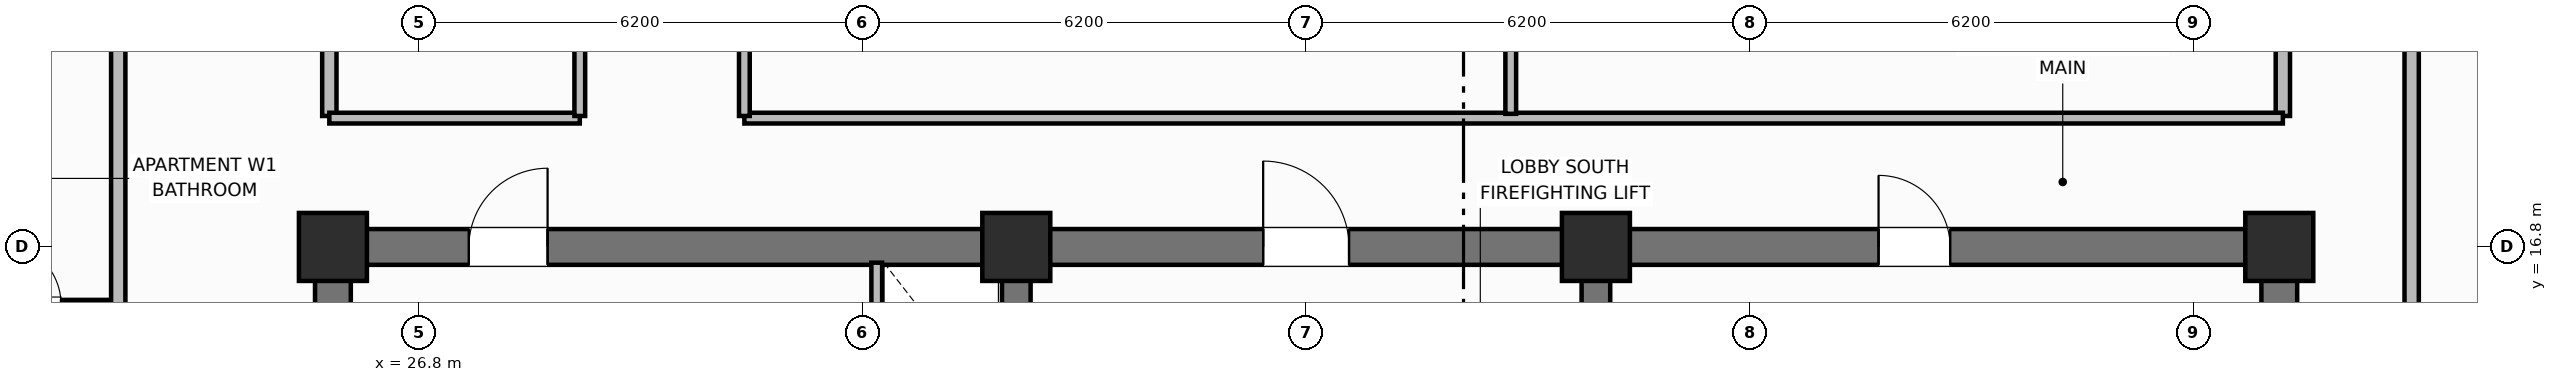
"""IFC4 building model, lengths in metres.
Left out: names, types, materials, properties, quantities, classifications, styles, units other than length and angle.
Written with IfcOpenShell. Run it as: python <this file> out.ifc"""

import sys

from ifc_helpers import new_model, si_unit, direction, frame, frame_2d, origin, origin_2d, place, context, subcontext, project, spatial, rectangle, extrude, element, fill, save


model = new_model("IFC4")
c1 = context("Model", 3, precision=1e-05, world=origin(), true_north=direction((0.0, 1.0)))
c2 = subcontext(c1, "Body", "Model", "MODEL_VIEW")
j1 = project(units=[si_unit("LENGTHUNIT", "METRE"), si_unit("PLANEANGLEUNIT", "RADIAN")], contexts=[c1])
p1 = place(None, origin())
s1 = spatial("IfcSite", under=j1, at=p1, CompositionType="ELEMENT")
p2 = place(p1, origin())
s2 = spatial("IfcBuilding", under=s1, at=p2, CompositionType="ELEMENT")
p3 = place(p2, frame((0.0, 0.0, 181.1)))
s3 = spatial("IfcBuildingStorey", under=s2, at=p3, CompositionType="ELEMENT", Elevation=181.1)
for number, where, z_axis, x_axis in (
    (1, (25.6, 10.85, 0.0), (0.0, 0.0, 1.0), (0.0, 1.0, 0.0)),
    (2, (52.8, 10.85, 0.0), (0.0, 0.0, 1.0), (0.0, 1.0, 0.0)),
):
    element("IfcWall", number, at=place(p3, frame(where, z_axis=z_axis, x_axis=x_axis)), inside=s3, PredefinedType="SHEAR", context=c2, shape_type="SweptSolid", body=[
        extrude(rectangle(XDim=5.7, YDim=0.5, at=frame_2d((2.85, 0.0))), origin(), (0.0, 0.0, 1.0), 3.7),
    ])
p4 = place(p3, frame((25.6, 16.8, 0.0), z_axis=(0.0, 0.0, 1.0), x_axis=(1.0, 0.0, 0.0)))
e3 = element("IfcWall", 3, at=p4, inside=s3, PredefinedType="SHEAR", context=c2, shape_type="SweptSolid", body=[
    extrude(rectangle(XDim=27.2, YDim=0.5, at=frame_2d((13.6, 0.0))), origin(), (0.0, 0.0, 1.0), 3.7),
])
p5 = place(p4, frame((1.9, 0.0, 0.0)))
e4 = element("IfcOpeningElement", 4, at=p5, cuts=e3, PredefinedType="OPENING", context=c2, shape_type="SweptSolid", body=[
    extrude(rectangle(XDim=1.1, YDim=2.15, at=frame_2d((0.55, 1.075))), frame((0.0, 0.26, 0.0), z_axis=(0.0, -1.0, 0.0), x_axis=(1.0, 0.0, 0.0)), (0.0, 0.0, 1.0), 0.52),
])
p6 = place(p4, frame((13.0, 0.0, 0.0)))
e5 = element("IfcOpeningElement", 5, at=p6, cuts=e3, PredefinedType="OPENING", context=c2, shape_type="SweptSolid", body=[
    extrude(rectangle(XDim=1.2, YDim=2.15, at=frame_2d((0.6, 1.075))), frame((0.0, 0.26, 0.0), z_axis=(0.0, -1.0, 0.0), x_axis=(1.0, 0.0, 0.0)), (0.0, 0.0, 1.0), 0.52),
])
p7 = place(p4, frame((21.6, 0.0, 0.0)))
e6 = element("IfcOpeningElement", 6, at=p7, cuts=e3, PredefinedType="OPENING", context=c2, shape_type="SweptSolid", body=[
    extrude(rectangle(XDim=1.0, YDim=2.15, at=frame_2d((0.5, 1.075))), frame((0.0, 0.26, 0.0), z_axis=(0.0, -1.0, 0.0), x_axis=(1.0, 0.0, 0.0)), (0.0, 0.0, 1.0), 0.52),
])
for number, where, z_axis, x_axis in (
    (7, (35.15, 10.85, 0.0), (0.0, 0.0, 1.0), (0.0, 1.0, 0.0)),
    (8, (43.25, 10.85, 0.0), (0.0, 0.0, 1.0), (0.0, 1.0, 0.0)),
):
    element("IfcWall", number, at=place(p3, frame(where, z_axis=z_axis, x_axis=x_axis)), inside=s3, PredefinedType="SHEAR", context=c2, shape_type="SweptSolid", body=[
        extrude(rectangle(XDim=5.7, YDim=0.4, at=frame_2d((2.85, 0.0))), origin(), (0.0, 0.0, 1.0), 3.7),
    ])
for number, where, z_axis, x_axis in (
    (9, (25.6, 16.8, 0.0), (0.0, 0.0, 1.0), (1.0, 0.0, 0.0)),
    (10, (35.15, 16.8, 0.0), (0.0, 0.0, 1.0), (1.0, 0.0, 0.0)),
    (11, (43.25, 16.8, 0.0), (0.0, 0.0, 1.0), (1.0, 0.0, 0.0)),
    (12, (52.8, 16.8, 0.0), (0.0, 0.0, 1.0), (1.0, 0.0, 0.0)),
):
    element("IfcColumn", number, at=place(p3, frame(where, z_axis=z_axis, x_axis=x_axis)), inside=s3, PredefinedType="COLUMN", context=c2, shape_type="SweptSolid", body=[
        extrude(rectangle(XDim=0.95, YDim=0.95, at=origin_2d()), origin(), (0.0, 0.0, 1.0), 3.7),
    ])
p8 = place(p3, frame((33.2, 14.5, 0.0), z_axis=(0.0, 0.0, 1.0), x_axis=(0.0, 1.0, 0.0)))
e13 = element("IfcWall", 13, at=p8, inside=s3, PredefinedType="PARTITIONING", context=c2, shape_type="SweptSolid", body=[
    extrude(rectangle(XDim=2.08, YDim=0.15, at=frame_2d((1.04, 0.0))), origin(), (0.0, 0.0, 1.0), 2.55),
])
p9 = place(p8, frame((0.55, 0.0, 0.0)))
e14 = element("IfcOpeningElement", 14, at=p9, cuts=e13, PredefinedType="OPENING", context=c2, shape_type="SweptSolid", body=[
    extrude(rectangle(XDim=0.85, YDim=2.05, at=frame_2d((0.425, 1.025))), frame((0.0, 0.085, 0.0), z_axis=(0.0, -1.0, 0.0), x_axis=(1.0, 0.0, 0.0)), (0.0, 0.0, 1.0), 0.17),
])
for number, where, z_axis, x_axis in (
    (15, (25.55, 18.63, 0.0), (0.0, 0.0, 1.0), (0.0, 1.0, 0.0)),
    (16, (52.85, 18.63, 0.0), (0.0, 0.0, 1.0), (0.0, 1.0, 0.0)),
):
    element("IfcWall", number, at=place(p3, frame(where, z_axis=z_axis, x_axis=x_axis)), inside=s3, PredefinedType="PARTITIONING", context=c2, shape_type="SweptSolid", body=[
        extrude(rectangle(XDim=19.14, YDim=0.2, at=frame_2d((9.57, 0.0))), origin(), (0.0, 0.0, 1.0), 2.55),
    ])
p10 = place(p3, frame((25.55, 18.6, 0.0), z_axis=(0.0, 0.0, 1.0), x_axis=(1.0, 0.0, 0.0)))
e17 = element("IfcWall", 17, at=p10, inside=s3, PredefinedType="PARTITIONING", context=c2, shape_type="SweptSolid", body=[
    extrude(rectangle(XDim=3.5, YDim=0.15, at=frame_2d((1.75, 0.0))), origin(), (0.0, 0.0, 1.0), 2.55),
])
p11 = place(p3, frame((31.35, 18.6, 0.0), z_axis=(0.0, 0.0, 1.0), x_axis=(1.0, 0.0, 0.0)))
e18 = element("IfcWall", 18, at=p11, inside=s3, PredefinedType="PARTITIONING", context=c2, shape_type="SweptSolid", body=[
    extrude(rectangle(XDim=21.5, YDim=0.15, at=frame_2d((10.75, 0.0))), origin(), (0.0, 0.0, 1.0), 2.55),
])
p12 = place(p3, frame((42.06, 18.66, 0.0), z_axis=(0.0, 0.0, 1.0), x_axis=(0.0, 1.0, 0.0)))
e19 = element("IfcWall", 19, at=p12, inside=s3, PredefinedType="PARTITIONING", context=c2, shape_type="SweptSolid", body=[
    extrude(rectangle(XDim=19.08, YDim=0.15, at=frame_2d((9.54, 0.0))), origin(), (0.0, 0.0, 1.0), 2.55),
])
p13 = place(p12, frame((6.5, 0.0, 0.0)))
e20 = element("IfcOpeningElement", 20, at=p13, cuts=e19, PredefinedType="OPENING", context=c2, shape_type="SweptSolid", body=[
    extrude(rectangle(XDim=1.0, YDim=2.15, at=frame_2d((0.5, 1.075))), frame((0.0, 0.085, 0.0), z_axis=(0.0, -1.0, 0.0), x_axis=(1.0, 0.0, 0.0)), (0.0, 0.0, 1.0), 0.17),
])
p14 = place(p3, frame((29.05, 18.63, 0.0), z_axis=(0.0, 0.0, 1.0), x_axis=(0.0, 1.0, 0.0)))
e21 = element("IfcWall", 21, at=p14, inside=s3, PredefinedType="PARTITIONING", context=c2, shape_type="SweptSolid", body=[
    extrude(rectangle(XDim=19.14, YDim=0.15, at=frame_2d((9.57, 0.0))), origin(), (0.0, 0.0, 1.0), 2.55),
])
p15 = place(p14, frame((5.5, 0.0, 0.0)))
e22 = element("IfcOpeningElement", 22, at=p15, cuts=e21, PredefinedType="OPENING", context=c2, shape_type="SweptSolid", body=[
    extrude(rectangle(XDim=1.0, YDim=2.15, at=frame_2d((0.5, 1.075))), frame((0.0, 0.085, 0.0), z_axis=(0.0, -1.0, 0.0), x_axis=(1.0, 0.0, 0.0)), (0.0, 0.0, 1.0), 0.17),
])
p16 = place(p3, frame((31.35, 18.63, 0.0), z_axis=(0.0, 0.0, 1.0), x_axis=(0.0, 1.0, 0.0)))
e23 = element("IfcWall", 23, at=p16, inside=s3, PredefinedType="PARTITIONING", context=c2, shape_type="SweptSolid", body=[
    extrude(rectangle(XDim=19.14, YDim=0.15, at=frame_2d((9.57, 0.0))), origin(), (0.0, 0.0, 1.0), 2.55),
])
p17 = place(p16, frame((5.5, 0.0, 0.0)))
e24 = element("IfcOpeningElement", 24, at=p17, cuts=e23, PredefinedType="OPENING", context=c2, shape_type="SweptSolid", body=[
    extrude(rectangle(XDim=1.0, YDim=2.15, at=frame_2d((0.5, 1.075))), frame((0.0, 0.085, 0.0), z_axis=(0.0, -1.0, 0.0), x_axis=(1.0, 0.0, 0.0)), (0.0, 0.0, 1.0), 0.17),
])
p18 = place(p3, frame((20.35, 16.0, 0.0), z_axis=(0.0, 0.0, 1.0), x_axis=(1.0, 0.0, 0.0)))
e25 = element("IfcWall", 25, at=p18, inside=s3, PredefinedType="PARTITIONING", context=c2, shape_type="SweptSolid", body=[
    extrude(rectangle(XDim=2.25, YDim=0.12, at=frame_2d((1.125, 0.0))), origin(), (0.0, 0.0, 1.0), 2.55),
])
p19 = place(p18, frame((0.6, 0.0, 0.0)))
e26 = element("IfcOpeningElement", 26, at=p19, cuts=e25, PredefinedType="OPENING", context=c2, shape_type="SweptSolid", body=[
    extrude(rectangle(XDim=0.85, YDim=2.1, at=frame_2d((0.425, 1.05))), frame((0.0, 0.07, 0.0), z_axis=(0.0, -1.0, 0.0), x_axis=(1.0, 0.0, 0.0)), (0.0, 0.0, 1.0), 0.14),
])
p20 = place(p3, frame((22.6, 10.6, 0.0), z_axis=(0.0, 0.0, 1.0), x_axis=(0.0, 1.0, 0.0)))
e27 = element("IfcWall", 27, at=p20, inside=s3, PredefinedType="PARTITIONING", context=c2, shape_type="SweptSolid", body=[
    extrude(rectangle(XDim=35.2, YDim=0.2, at=frame_2d((17.6, 0.0))), origin(), (0.0, 0.0, 1.0), 2.55),
])
p21 = place(p20, frame((2.65, 0.0, 0.0)))
e28 = element("IfcOpeningElement", 28, at=p21, cuts=e27, PredefinedType="OPENING", context=c2, shape_type="SweptSolid", body=[
    extrude(rectangle(XDim=1.0, YDim=2.15, at=frame_2d((0.5, 1.075))), frame((0.0, 0.11, 0.0), z_axis=(0.0, -1.0, 0.0), x_axis=(1.0, 0.0, 0.0)), (0.0, 0.0, 1.0), 0.22),
])
p22 = place(p20, frame((22.75, 0.0, 0.0)))
e29 = element("IfcOpeningElement", 29, at=p22, cuts=e27, PredefinedType="OPENING", context=c2, shape_type="SweptSolid", body=[
    extrude(rectangle(XDim=1.0, YDim=2.15, at=frame_2d((0.5, 1.075))), frame((0.0, 0.11, 0.0), z_axis=(0.0, -1.0, 0.0), x_axis=(1.0, 0.0, 0.0)), (0.0, 0.0, 1.0), 0.22),
])
p23 = place(p3, frame((54.65, 10.6, 0.0), z_axis=(0.0, 0.0, 1.0), x_axis=(0.0, 1.0, 0.0)))
e30 = element("IfcWall", 30, at=p23, inside=s3, PredefinedType="PARTITIONING", context=c2, shape_type="SweptSolid", body=[
    extrude(rectangle(XDim=35.2, YDim=0.2, at=frame_2d((17.6, 0.0))), origin(), (0.0, 0.0, 1.0), 2.55),
])
p24 = place(p23, frame((2.65, 0.0, 0.0)))
e31 = element("IfcOpeningElement", 31, at=p24, cuts=e30, PredefinedType="OPENING", context=c2, shape_type="SweptSolid", body=[
    extrude(rectangle(XDim=1.0, YDim=2.15, at=frame_2d((0.5, 1.075))), frame((0.0, 0.11, 0.0), z_axis=(0.0, -1.0, 0.0), x_axis=(1.0, 0.0, 0.0)), (0.0, 0.0, 1.0), 0.22),
])
p25 = place(p23, frame((11.352, 0.0, 0.0)))
e32 = element("IfcOpeningElement", 32, at=p25, cuts=e30, PredefinedType="OPENING", context=c2, shape_type="SweptSolid", body=[
    extrude(rectangle(XDim=1.0, YDim=2.15, at=frame_2d((0.5, 1.075))), frame((0.0, 0.11, 0.0), z_axis=(0.0, -1.0, 0.0), x_axis=(1.0, 0.0, 0.0)), (0.0, 0.0, 1.0), 0.22),
])
p26 = place(p23, frame((21.37, 0.0, 0.0)))
e33 = element("IfcOpeningElement", 33, at=p26, cuts=e30, PredefinedType="OPENING", context=c2, shape_type="SweptSolid", body=[
    extrude(rectangle(XDim=1.0, YDim=2.15, at=frame_2d((0.5, 1.075))), frame((0.0, 0.11, 0.0), z_axis=(0.0, -1.0, 0.0), x_axis=(1.0, 0.0, 0.0)), (0.0, 0.0, 1.0), 0.22),
])
p27 = place(p23, frame((27.302, 0.0, 0.0)))
e34 = element("IfcOpeningElement", 34, at=p27, cuts=e30, PredefinedType="OPENING", context=c2, shape_type="SweptSolid", body=[
    extrude(rectangle(XDim=1.0, YDim=2.15, at=frame_2d((0.5, 1.075))), frame((0.0, 0.11, 0.0), z_axis=(0.0, -1.0, 0.0), x_axis=(1.0, 0.0, 0.0)), (0.0, 0.0, 1.0), 0.22),
])
p28 = place(p19, origin())
e35 = element("IfcDoor", 35, at=p28, inside=s3, OperationType="SINGLE_SWING_LEFT", PredefinedType="DOOR", context=c2, shape_type="SweptSolid", body=[
    extrude(rectangle(XDim=0.85, YDim=2.1, at=frame_2d((0.425, 1.05))), frame((0.0, 0.025, 0.0), z_axis=(0.0, -1.0, 0.0), x_axis=(1.0, 0.0, 0.0)), (0.0, 0.0, 1.0), 0.05),
])
fill(e26, e35)
p29 = place(p5, origin())
e36 = element("IfcDoor", 36, at=p29, inside=s3, OperationType="SINGLE_SWING_RIGHT", PredefinedType="DOOR", context=c2, shape_type="SweptSolid", body=[
    extrude(rectangle(XDim=1.1, YDim=2.15, at=frame_2d((0.55, 1.075))), frame((0.0, 0.025, 0.0), z_axis=(0.0, -1.0, 0.0), x_axis=(1.0, 0.0, 0.0)), (0.0, 0.0, 1.0), 0.05),
])
fill(e4, e36)
p30 = place(p6, origin())
e37 = element("IfcDoor", 37, at=p30, inside=s3, OperationType="SINGLE_SWING_LEFT", PredefinedType="DOOR", context=c2, shape_type="SweptSolid", body=[
    extrude(rectangle(XDim=1.2, YDim=2.15, at=frame_2d((0.6, 1.075))), frame((0.0, 0.025, 0.0), z_axis=(0.0, -1.0, 0.0), x_axis=(1.0, 0.0, 0.0)), (0.0, 0.0, 1.0), 0.05),
])
fill(e5, e37)
p31 = place(p7, origin())
e38 = element("IfcDoor", 38, at=p31, inside=s3, OperationType="SINGLE_SWING_LEFT", PredefinedType="DOOR", context=c2, shape_type="SweptSolid", body=[
    extrude(rectangle(XDim=1.0, YDim=2.15, at=frame_2d((0.5, 1.075))), frame((0.0, 0.025, 0.0), z_axis=(0.0, -1.0, 0.0), x_axis=(1.0, 0.0, 0.0)), (0.0, 0.0, 1.0), 0.05),
])
fill(e6, e38)
save(model, sys.argv[1])
